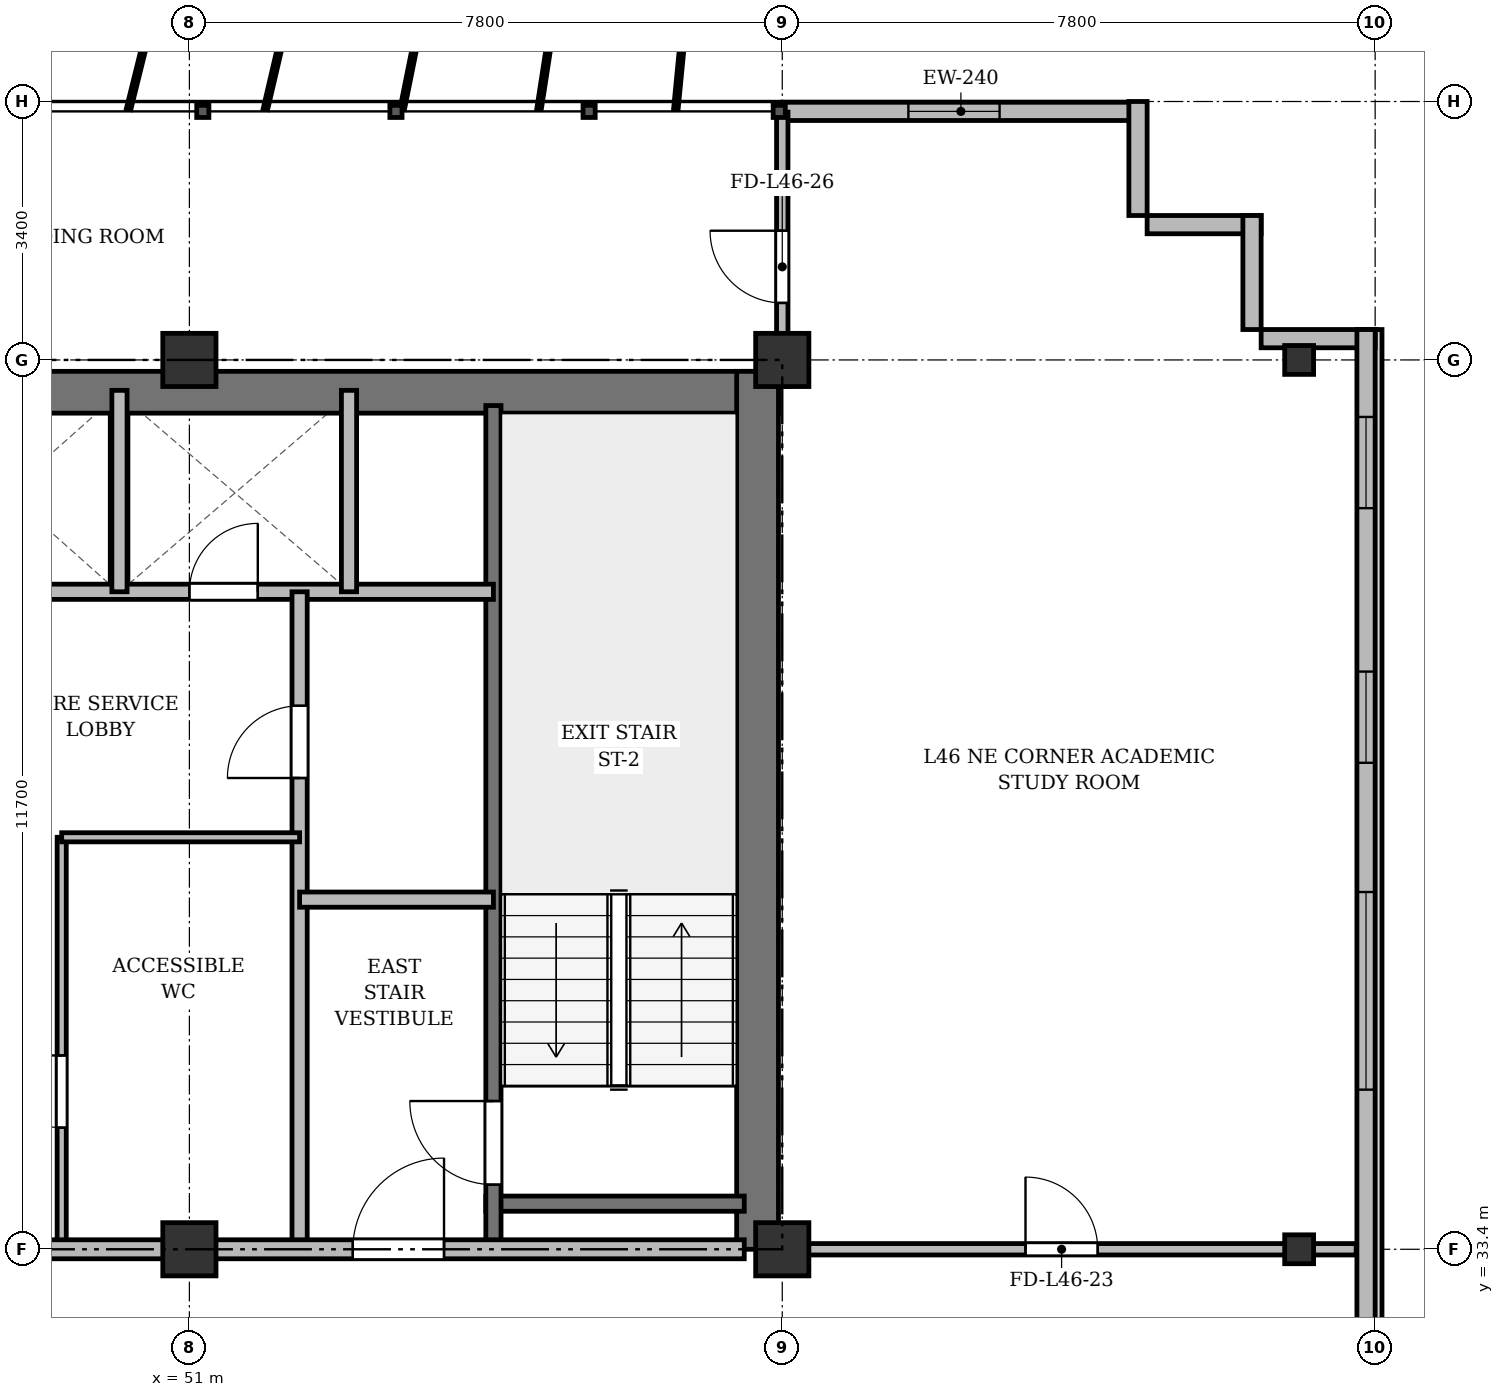
"""IFC4 building model, lengths in metres.
Left out: names, types, materials, properties, quantities, classifications, styles, units other than length and angle.
Written with IfcOpenShell. Run it as: python <this file> out.ifc"""

import sys

from ifc_helpers import new_model, si_unit, direction, frame, frame_2d, origin, origin_2d, place, context, subcontext, project, spatial, rectangle, i_section, extrude, source, transform, mapped, element, fill, save


model = new_model("IFC4")
c1 = context("Model", 3, precision=1e-05, world=origin(), true_north=direction((0.0, 1.0)))
c2 = subcontext(c1, "Body", "Model", "MODEL_VIEW")
j1 = project(units=[si_unit("LENGTHUNIT", "METRE"), si_unit("PLANEANGLEUNIT", "RADIAN")], contexts=[c1])
p1 = place(None, origin())
s1 = spatial("IfcSite", under=j1, at=p1, CompositionType="ELEMENT")
p2 = place(p1, origin())
s2 = spatial("IfcBuilding", under=s1, at=p2, CompositionType="ELEMENT")
p3 = place(p2, frame((0.0, 0.0, 175.3)))
s3 = spatial("IfcBuildingStorey", under=s2, at=p3, CompositionType="ELEMENT", Elevation=175.3)
m1 = source(origin(), c2, "Body", "SweptSolid", [
    extrude(rectangle(XDim=0.7, YDim=0.7, at=origin_2d()), origin(), (0.0, 0.0, 1.0), 3.6),
])
for number, where, z_axis, x_axis in (
    (1, (51.0, 33.4, 0.0), (0.0, 0.0, 1.0), (1.0, 0.0, 0.0)),
    (2, (51.0, 45.1, 0.0), (0.0, 0.0, 1.0), (1.0, 0.0, 0.0)),
    (3, (58.8, 33.4, 0.0), (0.0, 0.0, 1.0), (1.0, 0.0, 0.0)),
    (4, (58.8, 45.1, 0.0), (0.0, 0.0, 1.0), (1.0, 0.0, 0.0)),
):
    element("IfcColumn", number, at=place(p3, frame(where, z_axis=z_axis, x_axis=x_axis)), inside=s3, PredefinedType="COLUMN", context=c2, shape_type="MappedRepresentation", body=[
        mapped(m1, transform((0.0, 0.0, 0.0), x_axis=(1.0, 0.0, 0.0), y_axis=(0.0, 1.0, 0.0), z_axis=(0.0, 0.0, 1.0), scale=1.0)),
    ])
m2 = source(origin(), c2, "Body", "SweptSolid", [
    extrude(i_section(OverallWidth=0.38, OverallDepth=0.38, WebThickness=0.02, FlangeThickness=0.03, at=origin_2d()), origin(), (0.0, 0.0, 1.0), 3.6),
])
for number, where, z_axis, x_axis in (
    (5, (65.6, 33.4, 0.0), (0.0, 0.0, 1.0), (1.0, 0.0, 0.0)),
    (6, (65.6, 45.1, 0.0), (0.0, 0.0, 1.0), (1.0, 0.0, 0.0)),
):
    element("IfcColumn", number, at=place(p3, frame(where, z_axis=z_axis, x_axis=x_axis)), inside=s3, PredefinedType="COLUMN", context=c2, shape_type="MappedRepresentation", body=[
        mapped(m2, transform((0.0, 0.0, 0.0), x_axis=(1.0, 0.0, 0.0), y_axis=(0.0, 1.0, 0.0), z_axis=(0.0, 0.0, 1.0), scale=1.0)),
    ])
p4 = place(p3, frame((58.8, 48.37, 0.0), z_axis=(0.0, 0.0, 1.0), x_axis=(1.0, 0.0, 0.0)))
e7 = element("IfcWall", 7, at=p4, inside=s3, PredefinedType="SOLIDWALL", context=c2, shape_type="SweptSolid", body=[
    extrude(rectangle(XDim=4.7, YDim=0.24, at=frame_2d((2.35, 0.0))), origin(), (0.0, 0.0, 1.0), 3.35),
])
p5 = place(p4, frame((1.659, 0.0, 0.9)))
e8 = element("IfcOpeningElement", 8, at=p5, cuts=e7, PredefinedType="OPENING", context=c2, shape_type="SweptSolid", body=[
    extrude(rectangle(XDim=1.2, YDim=1.65, at=frame_2d((0.6, 0.825))), frame((0.0, 0.13, 0.0), z_axis=(0.0, -1.0, 0.0), x_axis=(1.0, 0.0, 0.0)), (0.0, 0.0, 1.0), 0.26),
])
for number, where, z_axis, x_axis in (
    (9, (63.48, 48.5, 0.0), (0.0, 0.0, 1.0), (0.0, -1.0, 0.0)),
    (10, (63.6, 46.88, 0.0), (0.0, 0.0, 1.0), (1.0, 0.0, 0.0)),
    (11, (64.98, 47.0, 0.0), (0.0, 0.0, 1.0), (0.0, -1.0, 0.0)),
    (12, (65.1, 45.38, 0.0), (0.0, 0.0, 1.0), (1.0, 0.0, 0.0)),
):
    element("IfcWall", number, at=place(p3, frame(where, z_axis=z_axis, x_axis=x_axis)), inside=s3, PredefinedType="SOLIDWALL", context=c2, shape_type="SweptSolid", body=[
        extrude(rectangle(XDim=1.5, YDim=0.24, at=frame_2d((0.75, 0.0))), origin(), (0.0, 0.0, 1.0), 3.35),
    ])
p6 = place(p3, frame((66.48, 45.5, 0.0), z_axis=(0.0, 0.0, 1.0), x_axis=(0.0, -1.0, 0.0)))
e13 = element("IfcWall", 13, at=p6, inside=s3, PredefinedType="SOLIDWALL", context=c2, shape_type="SweptSolid", body=[
    extrude(rectangle(XDim=39.2, YDim=0.24, at=frame_2d((19.6, 0.0))), origin(), (0.0, 0.0, 1.0), 3.35),
])
p7 = place(p6, frame((36.55, 0.0, 0.92)))
e14 = element("IfcOpeningElement", 14, at=p7, cuts=e13, PredefinedType="OPENING", context=c2, shape_type="SweptSolid", body=[
    extrude(rectangle(XDim=1.2, YDim=1.65, at=frame_2d((0.6, 0.825))), frame((0.0, 0.13, 0.0), z_axis=(0.0, -1.0, 0.0), x_axis=(1.0, 0.0, 0.0)), (0.0, 0.0, 1.0), 0.26),
])
p8 = place(p6, frame((32.8, 0.0, 0.92)))
e15 = element("IfcOpeningElement", 15, at=p8, cuts=e13, PredefinedType="OPENING", context=c2, shape_type="SweptSolid", body=[
    extrude(rectangle(XDim=2.6, YDim=1.9, at=frame_2d((1.3, 0.95))), frame((0.0, 0.13, 0.0), z_axis=(0.0, -1.0, 0.0), x_axis=(1.0, 0.0, 0.0)), (0.0, 0.0, 1.0), 0.26),
])
p9 = place(p6, frame((28.6, 0.0, 0.92)))
e16 = element("IfcOpeningElement", 16, at=p9, cuts=e13, PredefinedType="OPENING", context=c2, shape_type="SweptSolid", body=[
    extrude(rectangle(XDim=2.6, YDim=1.9, at=frame_2d((1.3, 0.95))), frame((0.0, 0.13, 0.0), z_axis=(0.0, -1.0, 0.0), x_axis=(1.0, 0.0, 0.0)), (0.0, 0.0, 1.0), 0.26),
])
p10 = place(p6, frame((21.4, 0.0, 0.92)))
e17 = element("IfcOpeningElement", 17, at=p10, cuts=e13, PredefinedType="OPENING", context=c2, shape_type="SweptSolid", body=[
    extrude(rectangle(XDim=2.6, YDim=1.9, at=frame_2d((1.3, 0.95))), frame((0.0, 0.13, 0.0), z_axis=(0.0, -1.0, 0.0), x_axis=(1.0, 0.0, 0.0)), (0.0, 0.0, 1.0), 0.26),
])
p11 = place(p6, frame((7.4, 0.0, 0.92)))
e18 = element("IfcOpeningElement", 18, at=p11, cuts=e13, PredefinedType="OPENING", context=c2, shape_type="SweptSolid", body=[
    extrude(rectangle(XDim=2.6, YDim=1.9, at=frame_2d((1.3, 0.95))), frame((0.0, 0.13, 0.0), z_axis=(0.0, -1.0, 0.0), x_axis=(1.0, 0.0, 0.0)), (0.0, 0.0, 1.0), 0.26),
])
p12 = place(p6, frame((4.5, 0.0, 0.92)))
e19 = element("IfcOpeningElement", 19, at=p12, cuts=e13, PredefinedType="OPENING", context=c2, shape_type="SweptSolid", body=[
    extrude(rectangle(XDim=1.2, YDim=1.65, at=frame_2d((0.6, 0.825))), frame((0.0, 0.13, 0.0), z_axis=(0.0, -1.0, 0.0), x_axis=(1.0, 0.0, 0.0)), (0.0, 0.0, 1.0), 0.26),
])
p13 = place(p6, frame((1.15, 0.0, 0.92)))
e20 = element("IfcOpeningElement", 20, at=p13, cuts=e13, PredefinedType="OPENING", context=c2, shape_type="SweptSolid", body=[
    extrude(rectangle(XDim=1.2, YDim=1.65, at=frame_2d((0.6, 0.825))), frame((0.0, 0.13, 0.0), z_axis=(0.0, -1.0, 0.0), x_axis=(1.0, 0.0, 0.0)), (0.0, 0.0, 1.0), 0.26),
])
p14 = place(p3, frame((15.65, 44.675, 0.0), z_axis=(0.0, 0.0, 1.0), x_axis=(1.0, 0.0, 0.0)))
e21 = element("IfcWall", 21, at=p14, inside=s3, PredefinedType="SHEAR", context=c2, shape_type="SweptSolid", body=[
    extrude(rectangle(XDim=43.1, YDim=0.55, at=frame_2d((21.55, 0.0))), origin(), (0.0, 0.0, 1.0), 3.35),
])
p15 = place(p3, frame((58.475, 33.4, 0.0), z_axis=(0.0, 0.0, 1.0), x_axis=(0.0, 1.0, 0.0)))
e22 = element("IfcWall", 22, at=p15, inside=s3, PredefinedType="SHEAR", context=c2, shape_type="SweptSolid", body=[
    extrude(rectangle(XDim=11.55, YDim=0.55, at=frame_2d((5.775, 0.0))), origin(), (0.0, 0.0, 1.0), 3.35),
])
p16 = place(p3, frame((54.9, 34.0, 0.0), z_axis=(0.0, 0.0, 1.0), x_axis=(1.0, 0.0, 0.0)))
e23 = element("IfcWall", 23, at=p16, inside=s3, PredefinedType="SHEAR", context=c2, shape_type="SweptSolid", body=[
    extrude(rectangle(XDim=3.4, YDim=0.2, at=frame_2d((1.7, 0.0))), origin(), (0.0, 0.0, 1.0), 3.35),
])
p17 = place(p3, frame((55.0, 33.4, 0.0), z_axis=(0.0, 0.0, 1.0), x_axis=(0.0, 1.0, 0.0)))
e24 = element("IfcWall", 24, at=p17, inside=s3, PredefinedType="SHEAR", context=c2, shape_type="SweptSolid", body=[
    extrude(rectangle(XDim=11.1, YDim=0.2, at=frame_2d((5.55, 0.0))), origin(), (0.0, 0.0, 1.0), 3.35),
])
p18 = place(p17, frame((0.85, 0.0, 0.0)))
e25 = element("IfcOpeningElement", 25, at=p18, cuts=e24, PredefinedType="OPENING", context=c2, shape_type="SweptSolid", body=[
    extrude(rectangle(XDim=1.1, YDim=2.15, at=frame_2d((0.55, 1.075))), frame((0.0, 0.11, 0.0), z_axis=(0.0, -1.0, 0.0), x_axis=(1.0, 0.0, 0.0)), (0.0, 0.0, 1.0), 0.22),
])
p19 = place(p3, frame((47.15, 42.05, 0.0), z_axis=(0.0, 0.0, 1.0), x_axis=(1.0, 0.0, 0.0)))
e26 = element("IfcWall", 26, at=p19, inside=s3, PredefinedType="SOLIDWALL", context=c2, shape_type="SweptSolid", body=[
    extrude(rectangle(XDim=7.85, YDim=0.2, at=frame_2d((3.925, 0.0))), origin(), (0.0, 0.0, 1.0), 2.85),
])
p20 = place(p19, frame((0.75, 0.0, 0.0)))
e27 = element("IfcOpeningElement", 27, at=p20, cuts=e26, PredefinedType="OPENING", context=c2, shape_type="SweptSolid", body=[
    extrude(rectangle(XDim=0.9, YDim=2.1, at=frame_2d((0.45, 1.05))), frame((0.0, 0.11, 0.0), z_axis=(0.0, -1.0, 0.0), x_axis=(1.0, 0.0, 0.0)), (0.0, 0.0, 1.0), 0.22),
])
p21 = place(p19, frame((3.85, 0.0, 0.0)))
e28 = element("IfcOpeningElement", 28, at=p21, cuts=e26, PredefinedType="OPENING", context=c2, shape_type="SweptSolid", body=[
    extrude(rectangle(XDim=0.9, YDim=2.1, at=frame_2d((0.45, 1.05))), frame((0.0, 0.11, 0.0), z_axis=(0.0, -1.0, 0.0), x_axis=(1.0, 0.0, 0.0)), (0.0, 0.0, 1.0), 0.22),
])
for number, where, z_axis, x_axis in (
    (29, (50.08, 42.05, 0.0), (0.0, 0.0, 1.0), (0.0, 1.0, 0.0)),
    (30, (53.1, 42.05, 0.0), (0.0, 0.0, 1.0), (0.0, 1.0, 0.0)),
):
    element("IfcWall", number, at=place(p3, frame(where, z_axis=z_axis, x_axis=x_axis)), inside=s3, PredefinedType="SOLIDWALL", context=c2, shape_type="SweptSolid", body=[
        extrude(rectangle(XDim=2.65, YDim=0.2, at=frame_2d((1.325, 0.0))), origin(), (0.0, 0.0, 1.0), 3.35),
    ])
p22 = place(p3, frame((52.45, 33.4, 0.0), z_axis=(0.0, 0.0, 1.0), x_axis=(0.0, 1.0, 0.0)))
e31 = element("IfcWall", 31, at=p22, inside=s3, PredefinedType="PARTITIONING", context=c2, shape_type="SweptSolid", body=[
    extrude(rectangle(XDim=8.65, YDim=0.2, at=frame_2d((4.325, 0.0))), origin(), (0.0, 0.0, 1.0), 2.75),
])
p23 = place(p22, frame((6.2, 0.0, 0.0)))
e32 = element("IfcOpeningElement", 32, at=p23, cuts=e31, PredefinedType="OPENING", context=c2, shape_type="SweptSolid", body=[
    extrude(rectangle(XDim=0.95, YDim=2.15, at=frame_2d((0.475, 1.075))), frame((0.0, 0.11, 0.0), z_axis=(0.0, -1.0, 0.0), x_axis=(1.0, 0.0, 0.0)), (0.0, 0.0, 1.0), 0.22),
])
p24 = place(p3, frame((52.45, 38.0, 0.0), z_axis=(0.0, 0.0, 1.0), x_axis=(1.0, 0.0, 0.0)))
e33 = element("IfcWall", 33, at=p24, inside=s3, PredefinedType="PARTITIONING", context=c2, shape_type="SweptSolid", body=[
    extrude(rectangle(XDim=2.55, YDim=0.2, at=frame_2d((1.275, 0.0))), origin(), (0.0, 0.0, 1.0), 3.35),
])
p25 = place(p3, frame((49.32, 33.4, 0.0), z_axis=(0.0, 0.0, 1.0), x_axis=(0.0, 1.0, 0.0)))
e34 = element("IfcWall", 34, at=p25, inside=s3, PredefinedType="PARTITIONING", context=c2, shape_type="SweptSolid", body=[
    extrude(rectangle(XDim=5.42, YDim=0.12, at=frame_2d((2.71, 0.0))), origin(), (0.0, 0.0, 1.0), 2.75),
])
p26 = place(p25, frame((1.6, 0.0, 0.0)))
e35 = element("IfcOpeningElement", 35, at=p26, cuts=e34, PredefinedType="OPENING", context=c2, shape_type="SweptSolid", body=[
    extrude(rectangle(XDim=0.95, YDim=2.15, at=frame_2d((0.475, 1.075))), frame((0.0, 0.07, 0.0), z_axis=(0.0, -1.0, 0.0), x_axis=(1.0, 0.0, 0.0)), (0.0, 0.0, 1.0), 0.14),
])
p27 = place(p3, frame((49.32, 38.82, 0.0), z_axis=(0.0, 0.0, 1.0), x_axis=(1.0, 0.0, 0.0)))
e36 = element("IfcWall", 36, at=p27, inside=s3, PredefinedType="PARTITIONING", context=c2, shape_type="SweptSolid", body=[
    extrude(rectangle(XDim=3.13, YDim=0.12, at=frame_2d((1.565, 0.0))), origin(), (0.0, 0.0, 1.0), 2.85),
])
p28 = place(p3, frame((47.15, 33.4, 0.0), z_axis=(0.0, 0.0, 1.0), x_axis=(1.0, 0.0, 0.0)))
e37 = element("IfcWall", 37, at=p28, inside=s3, PredefinedType="PARTITIONING", context=c2, shape_type="SweptSolid", body=[
    extrude(rectangle(XDim=11.15, YDim=0.25, at=frame_2d((5.575, 0.0))), origin(), (0.0, 0.0, 1.0), 2.75),
])
p29 = place(p28, frame((0.7, 0.0, 0.0)))
e38 = element("IfcOpeningElement", 38, at=p29, cuts=e37, PredefinedType="OPENING", context=c2, shape_type="SweptSolid", body=[
    extrude(rectangle(XDim=0.95, YDim=2.15, at=frame_2d((0.475, 1.075))), frame((0.0, 0.135, 0.0), z_axis=(0.0, -1.0, 0.0), x_axis=(1.0, 0.0, 0.0)), (0.0, 0.0, 1.0), 0.27),
])
p30 = place(p28, frame((6.0, 0.0, 0.0)))
e39 = element("IfcOpeningElement", 39, at=p30, cuts=e37, PredefinedType="OPENING", context=c2, shape_type="SweptSolid", body=[
    extrude(rectangle(XDim=1.2, YDim=2.15, at=frame_2d((0.6, 1.075))), frame((0.0, 0.135, 0.0), z_axis=(0.0, -1.0, 0.0), x_axis=(1.0, 0.0, 0.0)), (0.0, 0.0, 1.0), 0.27),
])
p31 = place(p3, frame((58.8, 33.4, 0.0), z_axis=(0.0, 0.0, 1.0), x_axis=(1.0, 0.0, 0.0)))
e40 = element("IfcWall", 40, at=p31, inside=s3, PredefinedType="PARTITIONING", context=c2, shape_type="SweptSolid", body=[
    extrude(rectangle(XDim=7.55, YDim=0.15, at=frame_2d((3.775, 0.0))), origin(), (0.0, 0.0, 1.0), 2.75),
])
p32 = place(p31, frame((3.2, 0.0, 0.0)))
e41 = element("IfcOpeningElement", 41, at=p32, cuts=e40, PredefinedType="OPENING", context=c2, shape_type="SweptSolid", body=[
    extrude(rectangle(XDim=0.95, YDim=2.15, at=frame_2d((0.475, 1.075))), frame((0.0, 0.085, 0.0), z_axis=(0.0, -1.0, 0.0), x_axis=(1.0, 0.0, 0.0)), (0.0, 0.0, 1.0), 0.17),
])
p33 = place(p3, frame((58.8, 44.75, 0.0), z_axis=(0.0, 0.0, 1.0), x_axis=(0.0, 1.0, 0.0)))
e42 = element("IfcWall", 42, at=p33, inside=s3, PredefinedType="PARTITIONING", context=c2, shape_type="SweptSolid", body=[
    extrude(rectangle(XDim=3.61, YDim=0.15, at=frame_2d((1.805, 0.0))), origin(), (0.0, 0.0, 1.0), 2.85),
])
p34 = place(p33, frame((1.1, 0.0, 0.0)))
e43 = element("IfcOpeningElement", 43, at=p34, cuts=e42, PredefinedType="OPENING", context=c2, shape_type="SweptSolid", body=[
    extrude(rectangle(XDim=0.95, YDim=2.15, at=frame_2d((0.475, 1.075))), frame((0.0, 0.085, 0.0), z_axis=(0.0, -1.0, 0.0), x_axis=(1.0, 0.0, 0.0)), (0.0, 0.0, 1.0), 0.17),
])
m3 = source(origin(), c2, "Body", "SweptSolid", [
    extrude(rectangle(XDim=1.2, YDim=1.65, at=frame_2d((0.6, 0.825))), frame((0.0, 0.03, 0.0), z_axis=(0.0, -1.0, 0.0), x_axis=(1.0, 0.0, 0.0)), (0.0, 0.0, 1.0), 0.06),
])
p35 = place(p5, origin())
e44 = element("IfcWindow", 44, at=p35, inside=s3, PartitioningType="SINGLE_PANEL", PredefinedType="WINDOW", context=c2, shape_type="MappedRepresentation", body=[
    mapped(m3, transform((0.0, 0.0, 0.0), x_axis=(1.0, 0.0, 0.0), y_axis=(0.0, 1.0, 0.0), z_axis=(0.0, 0.0, 1.0), scale=1.0)),
])
fill(e8, e44)
m4 = source(origin(), c2, "Body", "SweptSolid", [
    extrude(rectangle(XDim=2.6, YDim=1.9, at=frame_2d((1.3, 0.95))), frame((0.0, 0.03, 0.0), z_axis=(0.0, -1.0, 0.0), x_axis=(1.0, 0.0, 0.0)), (0.0, 0.0, 1.0), 0.06),
])
p36 = place(p11, origin())
e45 = element("IfcWindow", 45, at=p36, inside=s3, PartitioningType="SINGLE_PANEL", PredefinedType="WINDOW", context=c2, shape_type="MappedRepresentation", body=[
    mapped(m4, transform((0.0, 0.0, 0.0), x_axis=(1.0, 0.0, 0.0), y_axis=(0.0, 1.0, 0.0), z_axis=(0.0, 0.0, 1.0), scale=1.0)),
])
fill(e18, e45)
p37 = place(p12, origin())
e46 = element("IfcWindow", 46, at=p37, inside=s3, PartitioningType="SINGLE_PANEL", PredefinedType="WINDOW", context=c2, shape_type="MappedRepresentation", body=[
    mapped(m3, transform((0.0, 0.0, 0.0), x_axis=(1.0, 0.0, 0.0), y_axis=(0.0, 1.0, 0.0), z_axis=(0.0, 0.0, 1.0), scale=1.0)),
])
fill(e19, e46)
p38 = place(p13, origin())
e47 = element("IfcWindow", 47, at=p38, inside=s3, PartitioningType="SINGLE_PANEL", PredefinedType="WINDOW", context=c2, shape_type="MappedRepresentation", body=[
    mapped(m3, transform((0.0, 0.0, 0.0), x_axis=(1.0, 0.0, 0.0), y_axis=(0.0, 1.0, 0.0), z_axis=(0.0, 0.0, 1.0), scale=1.0)),
])
fill(e20, e47)
m5 = source(origin(), c2, "Body", "SweptSolid", [
    extrude(rectangle(XDim=1.1, YDim=2.15, at=frame_2d((0.55, 1.075))), frame((0.0, 0.025, 0.0), z_axis=(0.0, -1.0, 0.0), x_axis=(1.0, 0.0, 0.0)), (0.0, 0.0, 1.0), 0.05),
])
p39 = place(p18, origin())
e48 = element("IfcDoor", 48, at=p39, inside=s3, OperationType="SINGLE_SWING_RIGHT", PredefinedType="DOOR", context=c2, shape_type="MappedRepresentation", body=[
    mapped(m5, transform((0.0, 0.0, 0.0), x_axis=(1.0, 0.0, 0.0), y_axis=(0.0, 1.0, 0.0), z_axis=(0.0, 0.0, 1.0), scale=1.0)),
])
fill(e25, e48)
m6 = source(origin(), c2, "Body", "SweptSolid", [
    extrude(rectangle(XDim=0.9, YDim=2.1, at=frame_2d((0.45, 1.05))), frame((0.0, 0.025, 0.0), z_axis=(0.0, -1.0, 0.0), x_axis=(1.0, 0.0, 0.0)), (0.0, 0.0, 1.0), 0.05),
])
p40 = place(p21, origin())
e49 = element("IfcDoor", 49, at=p40, inside=s3, OperationType="SINGLE_SWING_RIGHT", PredefinedType="DOOR", context=c2, shape_type="MappedRepresentation", body=[
    mapped(m6, transform((0.0, 0.0, 0.0), x_axis=(1.0, 0.0, 0.0), y_axis=(0.0, 1.0, 0.0), z_axis=(0.0, 0.0, 1.0), scale=1.0)),
])
fill(e28, e49)
m7 = source(origin(), c2, "Body", "SweptSolid", [
    extrude(rectangle(XDim=0.95, YDim=2.15, at=frame_2d((0.475, 1.075))), frame((0.0, 0.025, 0.0), z_axis=(0.0, -1.0, 0.0), x_axis=(1.0, 0.0, 0.0)), (0.0, 0.0, 1.0), 0.05),
])
p41 = place(p23, origin())
e50 = element("IfcDoor", 50, at=p41, inside=s3, OperationType="SINGLE_SWING_LEFT", PredefinedType="DOOR", context=c2, shape_type="MappedRepresentation", body=[
    mapped(m7, transform((0.0, 0.0, 0.0), x_axis=(1.0, 0.0, 0.0), y_axis=(0.0, 1.0, 0.0), z_axis=(0.0, 0.0, 1.0), scale=1.0)),
])
fill(e32, e50)
p42 = place(p26, origin())
e51 = element("IfcDoor", 51, at=p42, inside=s3, OperationType="SINGLE_SWING_RIGHT", PredefinedType="DOOR", context=c2, shape_type="MappedRepresentation", body=[
    mapped(m7, transform((0.0, 0.0, 0.0), x_axis=(1.0, 0.0, 0.0), y_axis=(0.0, 1.0, 0.0), z_axis=(0.0, 0.0, 1.0), scale=1.0)),
])
fill(e35, e51)
m8 = source(origin(), c2, "Body", "SweptSolid", [
    extrude(rectangle(XDim=1.2, YDim=2.15, at=frame_2d((0.6, 1.075))), frame((0.0, 0.025, 0.0), z_axis=(0.0, -1.0, 0.0), x_axis=(1.0, 0.0, 0.0)), (0.0, 0.0, 1.0), 0.05),
])
p43 = place(p30, origin())
e52 = element("IfcDoor", 52, at=p43, inside=s3, OperationType="SINGLE_SWING_RIGHT", PredefinedType="DOOR", context=c2, shape_type="MappedRepresentation", body=[
    mapped(m8, transform((0.0, 0.0, 0.0), x_axis=(1.0, 0.0, 0.0), y_axis=(0.0, 1.0, 0.0), z_axis=(0.0, 0.0, 1.0), scale=1.0)),
])
fill(e39, e52)
p44 = place(p32, origin())
e53 = element("IfcDoor", 53, at=p44, inside=s3, OperationType="SINGLE_SWING_LEFT", PredefinedType="DOOR", context=c2, shape_type="MappedRepresentation", body=[
    mapped(m7, transform((0.0, 0.0, 0.0), x_axis=(1.0, 0.0, 0.0), y_axis=(0.0, 1.0, 0.0), z_axis=(0.0, 0.0, 1.0), scale=1.0)),
])
fill(e41, e53)
p45 = place(p34, origin())
e54 = element("IfcDoor", 54, at=p45, inside=s3, OperationType="SINGLE_SWING_RIGHT", PredefinedType="DOOR", context=c2, shape_type="MappedRepresentation", body=[
    mapped(m7, transform((0.0, 0.0, 0.0), x_axis=(1.0, 0.0, 0.0), y_axis=(0.0, 1.0, 0.0), z_axis=(0.0, 0.0, 1.0), scale=1.0)),
])
fill(e43, e54)
save(model, sys.argv[1])
